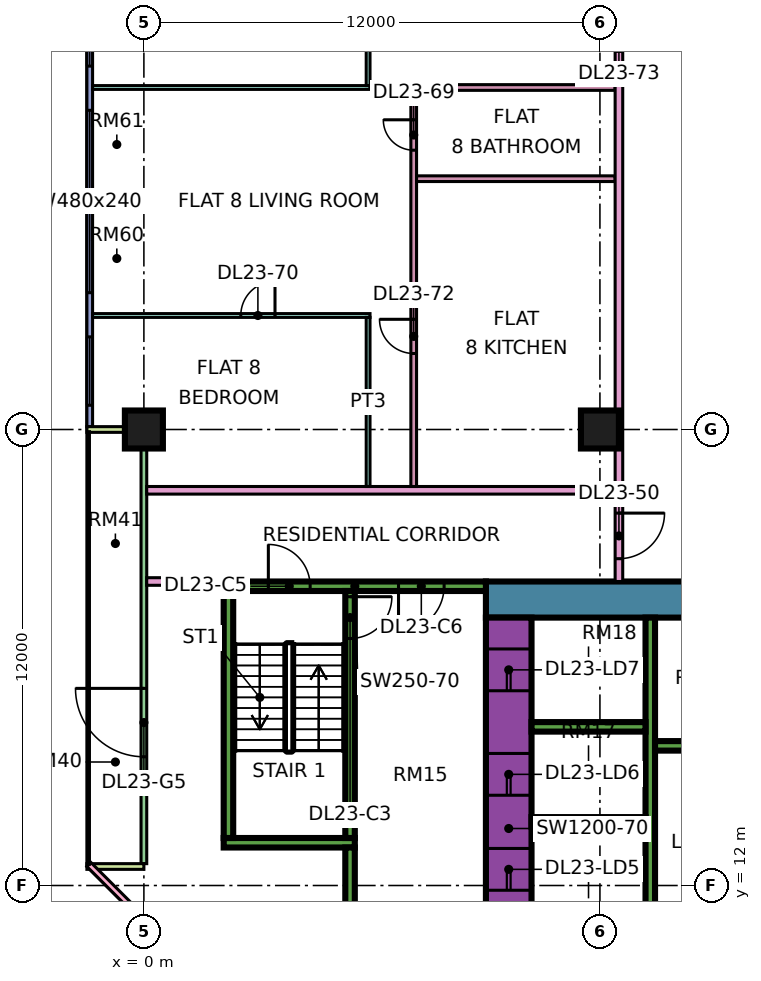
"""IFC4 building model, lengths in metres.
Left out: names, types, materials, properties, quantities, classifications, styles, units other than length and angle.
Written with IfcOpenShell. Run it as: python <this file> out.ifc"""

import sys

from ifc_helpers import new_model, si_unit, direction, frame, frame_2d, origin, origin_2d, place, context, subcontext, project, spatial, rectangle, extrude, element, fill, save


model = new_model("IFC4")
c1 = context("Model", 3, precision=1e-05, world=origin(), true_north=direction((0.0, 1.0)))
c2 = subcontext(c1, "Body", "Model", "MODEL_VIEW")
j1 = project(units=[si_unit("LENGTHUNIT", "METRE"), si_unit("PLANEANGLEUNIT", "RADIAN")], contexts=[c1])
p1 = place(None, origin())
s1 = spatial("IfcSite", under=j1, at=p1, CompositionType="ELEMENT")
p2 = place(p1, origin())
s2 = spatial("IfcBuilding", under=s1, at=p2, CompositionType="ELEMENT")
p3 = place(p2, frame((0.0, 0.0, 103.15)))
s3 = spatial("IfcBuildingStorey", under=s2, at=p3, CompositionType="ELEMENT", Elevation=103.15)
for number, where, z_axis, x_axis in (
    (1, (0.0, 24.0, 0.0), (0.0, 0.0, 1.0), (1.0, 0.0, 0.0)),
    (2, (12.0, 24.0, 0.0), (0.0, 0.0, 1.0), (1.0, 0.0, 0.0)),
):
    element("IfcColumn", number, at=place(p3, frame(where, z_axis=z_axis, x_axis=x_axis)), inside=s3, PredefinedType="COLUMN", context=c2, shape_type="SweptSolid", body=[
        extrude(rectangle(XDim=1.0, YDim=1.0, at=origin_2d()), origin(), (0.0, 0.0, 1.0), 3.75),
    ])
p4 = place(p3, frame((9.0, 19.525, 0.0), z_axis=(0.0, 0.0, 1.0), x_axis=(1.0, 0.0, 0.0)))
e3 = element("IfcWall", 3, at=p4, inside=s3, PredefinedType="SHEAR", context=c2, shape_type="SweptSolid", body=[
    extrude(rectangle(XDim=25.0, YDim=0.95, at=frame_2d((12.5, 0.0))), origin(), (0.0, 0.0, 1.0), 3.75),
])
p5 = place(p4, frame((19.1, 0.0, 0.0)))
e4 = element("IfcOpeningElement", 4, at=p5, cuts=e3, PredefinedType="OPENING", context=c2, shape_type="SweptSolid", body=[
    extrude(rectangle(XDim=1.8, YDim=2.4, at=frame_2d((0.9, 1.2))), frame((0.0, 0.485, 0.0), z_axis=(0.0, -1.0, 0.0), x_axis=(1.0, 0.0, 0.0)), (0.0, 0.0, 1.0), 0.97),
])
p6 = place(p3, frame((9.6, 7.95, 0.0), z_axis=(0.0, 0.0, 1.0), x_axis=(0.0, 1.0, 0.0)))
e5 = element("IfcWall", 5, at=p6, inside=s3, PredefinedType="SHEAR", context=c2, shape_type="SweptSolid", body=[
    extrude(rectangle(XDim=11.1, YDim=1.2, at=frame_2d((5.55, 0.0))), origin(), (0.0, 0.0, 1.0), 3.75),
])
p7 = place(p6, frame((3.925, 0.0, 0.0)))
e6 = element("IfcOpeningElement", 6, at=p7, cuts=e5, PredefinedType="OPENING", context=c2, shape_type="SweptSolid", body=[
    extrude(rectangle(XDim=1.1, YDim=2.2, at=frame_2d((0.55, 1.1))), frame((0.0, 0.61, 0.0), z_axis=(0.0, -1.0, 0.0), x_axis=(1.0, 0.0, 0.0)), (0.0, 0.0, 1.0), 1.22),
])
p8 = place(p6, frame((6.425, 0.0, 0.0)))
e7 = element("IfcOpeningElement", 7, at=p8, cuts=e5, PredefinedType="OPENING", context=c2, shape_type="SweptSolid", body=[
    extrude(rectangle(XDim=1.1, YDim=2.2, at=frame_2d((0.55, 1.1))), frame((0.0, 0.61, 0.0), z_axis=(0.0, -1.0, 0.0), x_axis=(1.0, 0.0, 0.0)), (0.0, 0.0, 1.0), 1.22),
])
p9 = place(p6, frame((9.175, 0.0, 0.0)))
e8 = element("IfcOpeningElement", 8, at=p9, cuts=e5, PredefinedType="OPENING", context=c2, shape_type="SweptSolid", body=[
    extrude(rectangle(XDim=1.1, YDim=2.2, at=frame_2d((0.55, 1.1))), frame((0.0, 0.61, 0.0), z_axis=(0.0, -1.0, 0.0), x_axis=(1.0, 0.0, 0.0)), (0.0, 0.0, 1.0), 1.22),
])
p10 = place(p6, frame((1.6, 0.0, 0.0)))
e9 = element("IfcOpeningElement", 9, at=p10, cuts=e5, PredefinedType="OPENING", context=c2, shape_type="SweptSolid", body=[
    extrude(rectangle(XDim=0.9, YDim=2.1, at=frame_2d((0.45, 1.05))), frame((0.0, 0.61, 0.0), z_axis=(0.0, -1.0, 0.0), x_axis=(1.0, 0.0, 0.0)), (0.0, 0.0, 1.0), 1.22),
])
p11 = place(p3, frame((13.325, 7.95, 0.0), z_axis=(0.0, 0.0, 1.0), x_axis=(0.0, 1.0, 0.0)))
e10 = element("IfcWall", 10, at=p11, inside=s3, PredefinedType="SHEAR", context=c2, shape_type="SweptSolid", body=[
    extrude(rectangle(XDim=11.1, YDim=0.25, at=frame_2d((5.55, 0.0))), origin(), (0.0, 0.0, 1.0), 3.75),
])
p12 = place(p3, frame((13.45, 15.675, 0.0), z_axis=(0.0, 0.0, 1.0), x_axis=(1.0, 0.0, 0.0)))
e11 = element("IfcWall", 11, at=p12, inside=s3, PredefinedType="SHEAR", context=c2, shape_type="SweptSolid", body=[
    extrude(rectangle(XDim=13.75, YDim=0.25, at=frame_2d((6.875, 0.0))), origin(), (0.0, 0.0, 1.0), 3.75),
])
for number, where, z_axis, x_axis in (
    (12, (10.2, 13.675, 0.0), (0.0, 0.0, 1.0), (1.0, 0.0, 0.0)),
    (13, (10.2, 16.175, 0.0), (0.0, 0.0, 1.0), (1.0, 0.0, 0.0)),
):
    element("IfcWall", number, at=place(p3, frame(where, z_axis=z_axis, x_axis=x_axis)), inside=s3, PredefinedType="SHEAR", context=c2, shape_type="SweptSolid", body=[
        extrude(rectangle(XDim=3.0, YDim=0.25, at=frame_2d((1.5, 0.0))), origin(), (0.0, 0.0, 1.0), 3.75),
    ])
p13 = place(p3, frame((2.1, 19.875, 0.0), z_axis=(0.0, 0.0, 1.0), x_axis=(1.0, 0.0, 0.0)))
e14 = element("IfcWall", 14, at=p13, inside=s3, PredefinedType="SHEAR", context=c2, shape_type="SweptSolid", body=[
    extrude(rectangle(XDim=6.9, YDim=0.25, at=frame_2d((3.45, 0.0))), origin(), (0.0, 0.0, 1.0), 3.75),
])
p14 = place(p13, frame((1.175, 0.0, 0.0)))
e15 = element("IfcOpeningElement", 15, at=p14, cuts=e14, PredefinedType="OPENING", context=c2, shape_type="SweptSolid", body=[
    extrude(rectangle(XDim=1.1, YDim=2.2, at=frame_2d((0.55, 1.1))), frame((0.0, 0.135, 0.0), z_axis=(0.0, -1.0, 0.0), x_axis=(1.0, 0.0, 0.0)), (0.0, 0.0, 1.0), 0.27),
])
p15 = place(p13, frame((4.6, 0.0, 0.0)))
e16 = element("IfcOpeningElement", 16, at=p15, cuts=e14, PredefinedType="OPENING", context=c2, shape_type="SweptSolid", body=[
    extrude(rectangle(XDim=1.2, YDim=2.2, at=frame_2d((0.6, 1.1))), frame((0.0, 0.135, 0.0), z_axis=(0.0, -1.0, 0.0), x_axis=(1.0, 0.0, 0.0)), (0.0, 0.0, 1.0), 0.27),
])
p16 = place(p3, frame((2.1, 13.125, 0.0), z_axis=(0.0, 0.0, 1.0), x_axis=(1.0, 0.0, 0.0)))
e17 = element("IfcWall", 17, at=p16, inside=s3, PredefinedType="SHEAR", context=c2, shape_type="SweptSolid", body=[
    extrude(rectangle(XDim=3.45, YDim=0.25, at=frame_2d((1.725, 0.0))), origin(), (0.0, 0.0, 1.0), 3.75),
])
p17 = place(p3, frame((2.225, 13.25, 0.0), z_axis=(0.0, 0.0, 1.0), x_axis=(0.0, 1.0, 0.0)))
e18 = element("IfcWall", 18, at=p17, inside=s3, PredefinedType="SHEAR", context=c2, shape_type="SweptSolid", body=[
    extrude(rectangle(XDim=6.5, YDim=0.25, at=frame_2d((3.25, 0.0))), origin(), (0.0, 0.0, 1.0), 3.75),
])
p18 = place(p3, frame((5.425, 13.25, 0.0), z_axis=(0.0, 0.0, 1.0), x_axis=(0.0, 1.0, 0.0)))
e19 = element("IfcWall", 19, at=p18, inside=s3, PredefinedType="SHEAR", context=c2, shape_type="SweptSolid", body=[
    extrude(rectangle(XDim=6.5, YDim=0.25, at=frame_2d((3.25, 0.0))), origin(), (0.0, 0.0, 1.0), 3.75),
])
p19 = place(p18, frame((5.25, 0.0, 0.0)))
e20 = element("IfcOpeningElement", 20, at=p19, cuts=e19, PredefinedType="OPENING", context=c2, shape_type="SweptSolid", body=[
    extrude(rectangle(XDim=1.1, YDim=2.2, at=frame_2d((0.55, 1.1))), frame((0.0, 0.135, 0.0), z_axis=(0.0, -1.0, 0.0), x_axis=(1.0, 0.0, 0.0)), (0.0, 0.0, 1.0), 0.27),
])
p20 = place(p3, frame((5.425, 9.0, 0.0), z_axis=(0.0, 0.0, 1.0), x_axis=(0.0, 1.0, 0.0)))
e21 = element("IfcWall", 21, at=p20, inside=s3, PredefinedType="SHEAR", context=c2, shape_type="SweptSolid", body=[
    extrude(rectangle(XDim=4.0, YDim=0.25, at=frame_2d((2.0, 0.0))), origin(), (0.0, 0.0, 1.0), 3.75),
])
p21 = place(p3, frame((-1.425, 35.925, 0.0), z_axis=(0.0, 0.0, 1.0), x_axis=(0.0, -1.0, 0.0)))
e22 = element("IfcWall", 22, at=p21, inside=s3, PredefinedType="SOLIDWALL", context=c2, shape_type="SweptSolid", body=[
    extrude(rectangle(XDim=11.85, YDim=0.15, at=frame_2d((5.925, 0.0))), origin(), (0.0, 0.0, 1.0), 3.35),
])
p22 = place(p21, frame((0.562, 0.0, 0.45)))
e23 = element("IfcOpeningElement", 23, at=p22, cuts=e22, PredefinedType="OPENING", context=c2, shape_type="SweptSolid", body=[
    extrude(rectangle(XDim=1.8, YDim=2.4, at=frame_2d((0.9, 1.2))), frame((0.0, 0.085, 0.0), z_axis=(0.0, -1.0, 0.0), x_axis=(1.0, 0.0, 0.0)), (0.0, 0.0, 1.0), 0.17),
])
p23 = place(p21, frame((3.525, 0.0, 0.45)))
e24 = element("IfcOpeningElement", 24, at=p23, cuts=e22, PredefinedType="OPENING", context=c2, shape_type="SweptSolid", body=[
    extrude(rectangle(XDim=4.8, YDim=2.4, at=frame_2d((2.4, 1.2))), frame((0.0, 0.085, 0.0), z_axis=(0.0, -1.0, 0.0), x_axis=(1.0, 0.0, 0.0)), (0.0, 0.0, 1.0), 0.17),
])
p24 = place(p21, frame((9.488, 0.0, 0.45)))
e25 = element("IfcOpeningElement", 25, at=p24, cuts=e22, PredefinedType="OPENING", context=c2, shape_type="SweptSolid", body=[
    extrude(rectangle(XDim=1.8, YDim=2.4, at=frame_2d((0.9, 1.2))), frame((0.0, 0.085, 0.0), z_axis=(0.0, -1.0, 0.0), x_axis=(1.0, 0.0, 0.0)), (0.0, 0.0, 1.0), 0.17),
])
p25 = place(p3, frame((0.0, 23.925, 0.0), z_axis=(0.0, 0.0, 1.0), x_axis=(0.0, -1.0, 0.0)))
e26 = element("IfcWall", 26, at=p25, inside=s3, PredefinedType="SOLIDWALL", context=c2, shape_type="SweptSolid", body=[
    extrude(rectangle(XDim=11.35, YDim=0.15, at=frame_2d((5.675, 0.0))), origin(), (0.0, 0.0, 1.0), 3.35),
])
p26 = place(p25, frame((6.738, 0.0, 0.0)))
e27 = element("IfcOpeningElement", 27, at=p26, cuts=e26, PredefinedType="OPENING", context=c2, shape_type="SweptSolid", body=[
    extrude(rectangle(XDim=1.8, YDim=2.4, at=frame_2d((0.9, 1.2))), frame((0.0, 0.085, 0.0), z_axis=(0.0, -1.0, 0.0), x_axis=(1.0, 0.0, 0.0)), (0.0, 0.0, 1.0), 0.17),
])
for number, where, z_axis, x_axis in (
    (28, (-1.5, 24.0, 0.0), (0.0, 0.0, 1.0), (1.0, 0.0, 0.0)),
    (29, (-1.5, 12.5, 0.0), (0.0, 0.0, 1.0), (1.0, 0.0, 0.0)),
):
    element("IfcWall", number, at=place(p3, frame(where, z_axis=z_axis, x_axis=x_axis)), inside=s3, PredefinedType="SOLIDWALL", context=c2, shape_type="SweptSolid", body=[
        extrude(rectangle(XDim=1.5, YDim=0.15, at=frame_2d((0.75, 0.0))), origin(), (0.0, 0.0, 1.0), 3.35),
    ])
p27 = place(p3, frame((-1.447, 12.553, 0.0), z_axis=(0.0, 0.0, 1.0), x_axis=(0.707106781187, -0.707106781187, 0.0)))
e30 = element("IfcWall", 30, at=p27, inside=s3, PredefinedType="SOLIDWALL", context=c2, shape_type="SweptSolid", body=[
    extrude(rectangle(XDim=19.799, YDim=0.15, at=frame_2d((9.899, 0.0))), origin(), (0.0, 0.0, 1.0), 3.35),
])
p28 = place(p27, frame((2.212, 0.0, 0.45)))
e31 = element("IfcOpeningElement", 31, at=p28, cuts=e30, PredefinedType="OPENING", context=c2, shape_type="SweptSolid", body=[
    extrude(rectangle(XDim=3.0, YDim=2.4, at=frame_2d((1.5, 1.2))), frame((0.0, 0.085, 0.0), z_axis=(0.0, -1.0, 0.0), x_axis=(1.0, 0.0, 0.0)), (0.0, 0.0, 1.0), 0.17),
])
p29 = place(p27, frame((10.216, 0.0, 0.45)))
e32 = element("IfcOpeningElement", 32, at=p29, cuts=e30, PredefinedType="OPENING", context=c2, shape_type="SweptSolid", body=[
    extrude(rectangle(XDim=3.0, YDim=2.4, at=frame_2d((1.5, 1.2))), frame((0.0, 0.085, 0.0), z_axis=(0.0, -1.0, 0.0), x_axis=(1.0, 0.0, 0.0)), (0.0, 0.0, 1.0), 0.17),
])
p30 = place(p3, frame((-1.35, 27.0, 0.0), z_axis=(0.0, 0.0, 1.0), x_axis=(1.0, 0.0, 0.0)))
e33 = element("IfcWall", 33, at=p30, inside=s3, PredefinedType="PARTITIONING", context=c2, shape_type="SweptSolid", body=[
    extrude(rectangle(XDim=7.3, YDim=0.1, at=frame_2d((3.65, 0.0))), origin(), (0.0, 0.0, 1.0), 3.35),
])
p31 = place(p30, frame((3.9, 0.0, 0.0)))
e34 = element("IfcOpeningElement", 34, at=p31, cuts=e33, PredefinedType="OPENING", context=c2, shape_type="SweptSolid", body=[
    extrude(rectangle(XDim=0.9, YDim=2.1, at=frame_2d((0.45, 1.05))), frame((0.0, 0.06, 0.0), z_axis=(0.0, -1.0, 0.0), x_axis=(1.0, 0.0, 0.0)), (0.0, 0.0, 1.0), 0.12),
])
p32 = place(p3, frame((-1.35, 33.0, 0.0), z_axis=(0.0, 0.0, 1.0), x_axis=(1.0, 0.0, 0.0)))
e35 = element("IfcWall", 35, at=p32, inside=s3, PredefinedType="PARTITIONING", context=c2, shape_type="SweptSolid", body=[
    extrude(rectangle(XDim=7.3, YDim=0.1, at=frame_2d((3.65, 0.0))), origin(), (0.0, 0.0, 1.0), 3.35),
])
p33 = place(p3, frame((0.074, 20.0, 0.0), z_axis=(0.0, 0.0, 1.0), x_axis=(1.0, 0.0, 0.0)))
e36 = element("IfcWall", 36, at=p33, inside=s3, PredefinedType="PARTITIONING", context=c2, shape_type="SweptSolid", body=[
    extrude(rectangle(XDim=2.026, YDim=0.2, at=frame_2d((1.013, 0.0))), origin(), (0.0, 0.0, 1.0), 3.35),
])
p34 = place(p3, frame((0.074, 22.4, 0.0), z_axis=(0.0, 0.0, 1.0), x_axis=(1.0, 0.0, 0.0)))
e37 = element("IfcWall", 37, at=p34, inside=s3, PredefinedType="PARTITIONING", context=c2, shape_type="SweptSolid", body=[
    extrude(rectangle(XDim=12.326, YDim=0.2, at=frame_2d((6.163, 0.0))), origin(), (0.0, 0.0, 1.0), 3.35),
])
p35 = place(p3, frame((5.9, 22.5, 0.0), z_axis=(0.0, 0.0, 1.0), x_axis=(0.0, 1.0, 0.0)))
e38 = element("IfcWall", 38, at=p35, inside=s3, PredefinedType="PARTITIONING", context=c2, shape_type="SweptSolid", body=[
    extrude(rectangle(XDim=4.45, YDim=0.1, at=frame_2d((2.225, 0.0))), origin(), (0.0, 0.0, 1.0), 3.35),
])
p36 = place(p3, frame((5.9, 33.05, 0.0), z_axis=(0.0, 0.0, 1.0), x_axis=(0.0, 1.0, 0.0)))
e39 = element("IfcWall", 39, at=p36, inside=s3, PredefinedType="PARTITIONING", context=c2, shape_type="SweptSolid", body=[
    extrude(rectangle(XDim=2.85, YDim=0.1, at=frame_2d((1.425, 0.0))), origin(), (0.0, 0.0, 1.0), 3.35),
])
p37 = place(p36, frame((1.0, 0.0, 0.0)))
e40 = element("IfcOpeningElement", 40, at=p37, cuts=e39, PredefinedType="OPENING", context=c2, shape_type="SweptSolid", body=[
    extrude(rectangle(XDim=0.9, YDim=2.1, at=frame_2d((0.45, 1.05))), frame((0.0, 0.06, 0.0), z_axis=(0.0, -1.0, 0.0), x_axis=(1.0, 0.0, 0.0)), (0.0, 0.0, 1.0), 0.12),
])
p38 = place(p3, frame((7.1, 22.5, 0.0), z_axis=(0.0, 0.0, 1.0), x_axis=(0.0, 1.0, 0.0)))
e41 = element("IfcWall", 41, at=p38, inside=s3, PredefinedType="PARTITIONING", context=c2, shape_type="SweptSolid", body=[
    extrude(rectangle(XDim=10.575, YDim=0.15, at=frame_2d((5.288, 0.0))), origin(), (0.0, 0.0, 1.0), 3.35),
])
p39 = place(p38, frame((8.85, 0.0, 0.0)))
e42 = element("IfcOpeningElement", 42, at=p39, cuts=e41, PredefinedType="OPENING", context=c2, shape_type="SweptSolid", body=[
    extrude(rectangle(XDim=0.8, YDim=2.1, at=frame_2d((0.4, 1.05))), frame((0.0, 0.085, 0.0), z_axis=(0.0, -1.0, 0.0), x_axis=(1.0, 0.0, 0.0)), (0.0, 0.0, 1.0), 0.17),
])
p40 = place(p38, frame((3.5, 0.0, 0.0)))
e43 = element("IfcOpeningElement", 43, at=p40, cuts=e41, PredefinedType="OPENING", context=c2, shape_type="SweptSolid", body=[
    extrude(rectangle(XDim=0.9, YDim=2.1, at=frame_2d((0.45, 1.05))), frame((0.0, 0.085, 0.0), z_axis=(0.0, -1.0, 0.0), x_axis=(1.0, 0.0, 0.0)), (0.0, 0.0, 1.0), 0.17),
])
for number, where, z_axis, x_axis in (
    (44, (7.175, 30.6, 0.0), (0.0, 0.0, 1.0), (1.0, 0.0, 0.0)),
    (45, (7.175, 33.0, 0.0), (0.0, 0.0, 1.0), (1.0, 0.0, 0.0)),
):
    element("IfcWall", number, at=place(p3, frame(where, z_axis=z_axis, x_axis=x_axis)), inside=s3, PredefinedType="PARTITIONING", context=c2, shape_type="SweptSolid", body=[
        extrude(rectangle(XDim=5.225, YDim=0.15, at=frame_2d((2.612, 0.0))), origin(), (0.0, 0.0, 1.0), 3.35),
    ])
p41 = place(p3, frame((12.5, 20.0, 0.0), z_axis=(0.0, 0.0, 1.0), x_axis=(0.0, 1.0, 0.0)))
e46 = element("IfcWall", 46, at=p41, inside=s3, PredefinedType="PARTITIONING", context=c2, shape_type="SweptSolid", body=[
    extrude(rectangle(XDim=42.926, YDim=0.2, at=frame_2d((21.463, 0.0))), origin(), (0.0, 0.0, 1.0), 3.35),
])
p42 = place(p41, frame((28.65, 0.0, 0.0)))
e47 = element("IfcOpeningElement", 47, at=p42, cuts=e46, PredefinedType="OPENING", context=c2, shape_type="SweptSolid", body=[
    extrude(rectangle(XDim=1.0, YDim=2.1, at=frame_2d((0.5, 1.05))), frame((0.0, 0.11, 0.0), z_axis=(0.0, -1.0, 0.0), x_axis=(1.0, 0.0, 0.0)), (0.0, 0.0, 1.0), 0.22),
])
p43 = place(p41, frame((32.1, 0.0, 0.0)))
e48 = element("IfcOpeningElement", 48, at=p43, cuts=e46, PredefinedType="OPENING", context=c2, shape_type="SweptSolid", body=[
    extrude(rectangle(XDim=1.0, YDim=2.1, at=frame_2d((0.5, 1.05))), frame((0.0, 0.11, 0.0), z_axis=(0.0, -1.0, 0.0), x_axis=(1.0, 0.0, 0.0)), (0.0, 0.0, 1.0), 0.22),
])
p44 = place(p41, frame((0.6, 0.0, 0.0)))
e49 = element("IfcOpeningElement", 49, at=p44, cuts=e46, PredefinedType="OPENING", context=c2, shape_type="SweptSolid", body=[
    extrude(rectangle(XDim=1.2, YDim=2.1, at=frame_2d((0.6, 1.05))), frame((0.0, 0.11, 0.0), z_axis=(0.0, -1.0, 0.0), x_axis=(1.0, 0.0, 0.0)), (0.0, 0.0, 1.0), 0.22),
])
p45 = place(p41, frame((13.95, 0.0, 0.0)))
e50 = element("IfcOpeningElement", 50, at=p45, cuts=e46, PredefinedType="OPENING", context=c2, shape_type="SweptSolid", body=[
    extrude(rectangle(XDim=1.0, YDim=2.1, at=frame_2d((0.5, 1.05))), frame((0.0, 0.11, 0.0), z_axis=(0.0, -1.0, 0.0), x_axis=(1.0, 0.0, 0.0)), (0.0, 0.0, 1.0), 0.22),
])
p46 = place(p22, origin())
e51 = element("IfcWindow", 51, at=p46, inside=s3, PartitioningType="SINGLE_PANEL", PredefinedType="WINDOW", context=c2, shape_type="SweptSolid", body=[
    extrude(rectangle(XDim=1.8, YDim=2.4, at=frame_2d((0.9, 1.2))), frame((0.0, 0.03, 0.0), z_axis=(0.0, -1.0, 0.0), x_axis=(1.0, 0.0, 0.0)), (0.0, 0.0, 1.0), 0.06),
])
fill(e23, e51)
p47 = place(p23, origin())
e52 = element("IfcWindow", 52, at=p47, inside=s3, PartitioningType="SINGLE_PANEL", PredefinedType="WINDOW", context=c2, shape_type="SweptSolid", body=[
    extrude(rectangle(XDim=4.8, YDim=2.4, at=frame_2d((2.4, 1.2))), frame((0.0, 0.03, 0.0), z_axis=(0.0, -1.0, 0.0), x_axis=(1.0, 0.0, 0.0)), (0.0, 0.0, 1.0), 0.06),
])
fill(e24, e52)
p48 = place(p24, origin())
e53 = element("IfcWindow", 53, at=p48, inside=s3, PartitioningType="SINGLE_PANEL", PredefinedType="WINDOW", context=c2, shape_type="SweptSolid", body=[
    extrude(rectangle(XDim=1.8, YDim=2.4, at=frame_2d((0.9, 1.2))), frame((0.0, 0.03, 0.0), z_axis=(0.0, -1.0, 0.0), x_axis=(1.0, 0.0, 0.0)), (0.0, 0.0, 1.0), 0.06),
])
fill(e25, e53)
p49 = place(p26, frame((1.8, 0.0, 0.0), z_axis=(0.0, 0.0, 1.0), x_axis=(-1.0, 0.0, 0.0)))
e54 = element("IfcDoor", 54, at=p49, inside=s3, OperationType="DOUBLE_DOOR_SINGLE_SWING", PredefinedType="DOOR", context=c2, shape_type="SweptSolid", body=[
    extrude(rectangle(XDim=1.8, YDim=2.4, at=frame_2d((0.9, 1.2))), frame((0.0, 0.025, 0.0), z_axis=(0.0, -1.0, 0.0), x_axis=(1.0, 0.0, 0.0)), (0.0, 0.0, 1.0), 0.05),
])
fill(e27, e54)
p50 = place(p7, origin())
e55 = element("IfcDoor", 55, at=p50, inside=s3, OperationType="DOUBLE_DOOR_SLIDING", PredefinedType="DOOR", context=c2, shape_type="SweptSolid", body=[
    extrude(rectangle(XDim=1.1, YDim=2.2, at=frame_2d((0.55, 1.1))), frame((0.0, 0.025, 0.0), z_axis=(0.0, -1.0, 0.0), x_axis=(1.0, 0.0, 0.0)), (0.0, 0.0, 1.0), 0.05),
])
fill(e6, e55)
p51 = place(p8, origin())
e56 = element("IfcDoor", 56, at=p51, inside=s3, OperationType="DOUBLE_DOOR_SLIDING", PredefinedType="DOOR", context=c2, shape_type="SweptSolid", body=[
    extrude(rectangle(XDim=1.1, YDim=2.2, at=frame_2d((0.55, 1.1))), frame((0.0, 0.025, 0.0), z_axis=(0.0, -1.0, 0.0), x_axis=(1.0, 0.0, 0.0)), (0.0, 0.0, 1.0), 0.05),
])
fill(e7, e56)
p52 = place(p9, origin())
e57 = element("IfcDoor", 57, at=p52, inside=s3, OperationType="DOUBLE_DOOR_SLIDING", PredefinedType="DOOR", context=c2, shape_type="SweptSolid", body=[
    extrude(rectangle(XDim=1.1, YDim=2.2, at=frame_2d((0.55, 1.1))), frame((0.0, 0.025, 0.0), z_axis=(0.0, -1.0, 0.0), x_axis=(1.0, 0.0, 0.0)), (0.0, 0.0, 1.0), 0.05),
])
fill(e8, e57)
p53 = place(p19, origin())
e58 = element("IfcDoor", 58, at=p53, inside=s3, OperationType="SINGLE_SWING_RIGHT", PredefinedType="DOOR", context=c2, shape_type="SweptSolid", body=[
    extrude(rectangle(XDim=1.1, YDim=2.2, at=frame_2d((0.55, 1.1))), frame((0.0, 0.025, 0.0), z_axis=(0.0, -1.0, 0.0), x_axis=(1.0, 0.0, 0.0)), (0.0, 0.0, 1.0), 0.05),
])
fill(e20, e58)
p54 = place(p14, origin())
e59 = element("IfcDoor", 59, at=p54, inside=s3, OperationType="SINGLE_SWING_LEFT", PredefinedType="DOOR", context=c2, shape_type="SweptSolid", body=[
    extrude(rectangle(XDim=1.1, YDim=2.2, at=frame_2d((0.55, 1.1))), frame((0.0, 0.025, 0.0), z_axis=(0.0, -1.0, 0.0), x_axis=(1.0, 0.0, 0.0)), (0.0, 0.0, 1.0), 0.05),
])
fill(e15, e59)
p55 = place(p15, frame((1.2, 0.0, 0.0), z_axis=(0.0, 0.0, 1.0), x_axis=(-1.0, 0.0, 0.0)))
e60 = element("IfcDoor", 60, at=p55, inside=s3, OperationType="SINGLE_SWING_LEFT", PredefinedType="DOOR", context=c2, shape_type="SweptSolid", body=[
    extrude(rectangle(XDim=1.2, YDim=2.2, at=frame_2d((0.6, 1.1))), frame((0.0, 0.025, 0.0), z_axis=(0.0, -1.0, 0.0), x_axis=(1.0, 0.0, 0.0)), (0.0, 0.0, 1.0), 0.05),
])
fill(e16, e60)
p56 = place(p44, origin())
e61 = element("IfcDoor", 61, at=p56, inside=s3, OperationType="SINGLE_SWING_RIGHT", PredefinedType="DOOR", context=c2, shape_type="SweptSolid", body=[
    extrude(rectangle(XDim=1.2, YDim=2.1, at=frame_2d((0.6, 1.05))), frame((0.0, 0.025, 0.0), z_axis=(0.0, -1.0, 0.0), x_axis=(1.0, 0.0, 0.0)), (0.0, 0.0, 1.0), 0.05),
])
fill(e49, e61)
p57 = place(p39, frame((0.8, 0.0, 0.0), z_axis=(0.0, 0.0, 1.0), x_axis=(-1.0, 0.0, 0.0)))
e62 = element("IfcDoor", 62, at=p57, inside=s3, OperationType="SINGLE_SWING_RIGHT", PredefinedType="DOOR", context=c2, shape_type="SweptSolid", body=[
    extrude(rectangle(XDim=0.8, YDim=2.1, at=frame_2d((0.4, 1.05))), frame((0.0, 0.025, 0.0), z_axis=(0.0, -1.0, 0.0), x_axis=(1.0, 0.0, 0.0)), (0.0, 0.0, 1.0), 0.05),
])
fill(e42, e62)
p58 = place(p31, frame((0.9, 0.0, 0.0), z_axis=(0.0, 0.0, 1.0), x_axis=(-1.0, 0.0, 0.0)))
e63 = element("IfcDoor", 63, at=p58, inside=s3, OperationType="SINGLE_SWING_RIGHT", PredefinedType="DOOR", context=c2, shape_type="SweptSolid", body=[
    extrude(rectangle(XDim=0.9, YDim=2.1, at=frame_2d((0.45, 1.05))), frame((0.0, 0.025, 0.0), z_axis=(0.0, -1.0, 0.0), x_axis=(1.0, 0.0, 0.0)), (0.0, 0.0, 1.0), 0.05),
])
fill(e34, e63)
p59 = place(p40, frame((0.9, 0.0, 0.0), z_axis=(0.0, 0.0, 1.0), x_axis=(-1.0, 0.0, 0.0)))
e64 = element("IfcDoor", 64, at=p59, inside=s3, OperationType="SINGLE_SWING_RIGHT", PredefinedType="DOOR", context=c2, shape_type="SweptSolid", body=[
    extrude(rectangle(XDim=0.9, YDim=2.1, at=frame_2d((0.45, 1.05))), frame((0.0, 0.025, 0.0), z_axis=(0.0, -1.0, 0.0), x_axis=(1.0, 0.0, 0.0)), (0.0, 0.0, 1.0), 0.05),
])
fill(e43, e64)
save(model, sys.argv[1])
